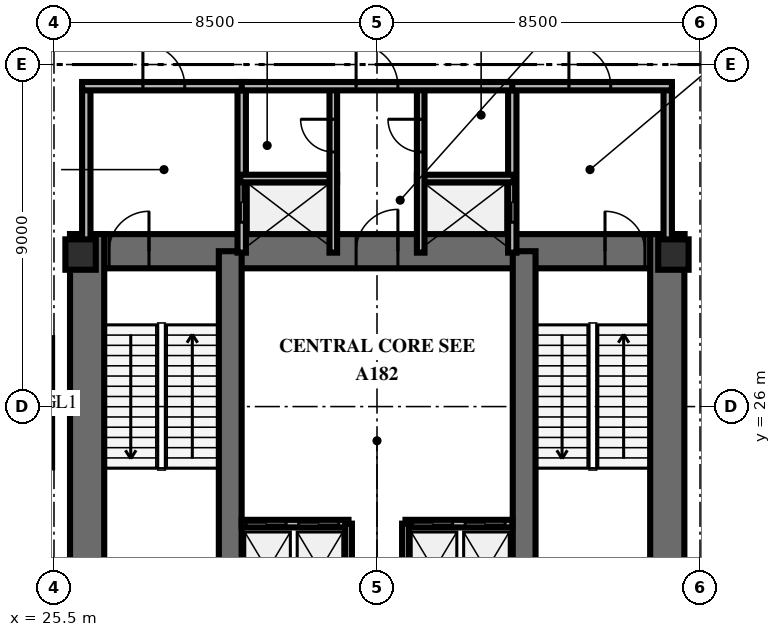
"""IFC4 building model, lengths in metres.
Left out: names, types, materials, properties, quantities, classifications, styles, units other than length and angle.
Written with IfcOpenShell. Run it as: python <this file> out.ifc"""

import sys

from ifc_helpers import new_model, si_unit, direction, frame, frame_2d, origin, origin_2d, place, context, subcontext, project, spatial, rectangle, extrude, element, fill, save


model = new_model("IFC4")
c1 = context("Model", 3, precision=1e-05, world=origin(), true_north=direction((0.0, 1.0)))
c2 = subcontext(c1, "Body", "Model", "MODEL_VIEW")
j1 = project(units=[si_unit("LENGTHUNIT", "METRE"), si_unit("PLANEANGLEUNIT", "RADIAN")], contexts=[c1])
p1 = place(None, origin())
s1 = spatial("IfcSite", under=j1, at=p1, CompositionType="ELEMENT")
p2 = place(p1, origin())
s2 = spatial("IfcBuilding", under=s1, at=p2, CompositionType="ELEMENT")
p3 = place(p2, frame((0.0, 0.0, -9.6)))
s3 = spatial("IfcBuildingStorey", under=s2, at=p3, CompositionType="ELEMENT", Elevation=-9.6)
p4 = place(p3, frame((25.922, 30.088, 0.0), z_axis=(0.0, 0.0, 1.0), x_axis=(1.0, 0.0, 0.0)))
e1 = element("IfcWall", 1, at=p4, inside=s3, PredefinedType="SHEAR", context=c2, shape_type="SweptSolid", body=[
    extrude(rectangle(XDim=16.166, YDim=0.9, at=frame_2d((8.083, 0.0))), origin(), (0.0, 0.0, 1.0), 4.8),
])
p5 = place(p4, frame((1.028, 0.0, 0.0)))
e2 = element("IfcOpeningElement", 2, at=p5, cuts=e1, PredefinedType="OPENING", context=c2, shape_type="SweptSolid", body=[
    extrude(rectangle(XDim=1.05, YDim=2.15, at=frame_2d((0.525, 1.075))), frame((0.0, 0.46, 0.0), z_axis=(0.0, -1.0, 0.0), x_axis=(1.0, 0.0, 0.0)), (0.0, 0.0, 1.0), 0.92),
])
p6 = place(p4, frame((14.078, 0.0, 0.0)))
e3 = element("IfcOpeningElement", 3, at=p6, cuts=e1, PredefinedType="OPENING", context=c2, shape_type="SweptSolid", body=[
    extrude(rectangle(XDim=1.05, YDim=2.15, at=frame_2d((0.525, 1.075))), frame((0.0, 0.46, 0.0), z_axis=(0.0, -1.0, 0.0), x_axis=(1.0, 0.0, 0.0)), (0.0, 0.0, 1.0), 0.92),
])
p7 = place(p4, frame((7.528, 0.0, 0.0)))
e4 = element("IfcOpeningElement", 4, at=p7, cuts=e1, PredefinedType="OPENING", context=c2, shape_type="SweptSolid", body=[
    extrude(rectangle(XDim=1.1, YDim=2.15, at=frame_2d((0.55, 1.075))), frame((0.0, 0.46, 0.0), z_axis=(0.0, -1.0, 0.0), x_axis=(1.0, 0.0, 0.0)), (0.0, 0.0, 1.0), 0.92),
])
for number, where, z_axis, x_axis in (
    (5, (26.372, 19.662, 0.0), (0.0, 0.0, 1.0), (0.0, 1.0, 0.0)),
    (6, (41.638, 19.662, 0.0), (0.0, 0.0, 1.0), (0.0, 1.0, 0.0)),
):
    element("IfcWall", number, at=place(p3, frame(where, z_axis=z_axis, x_axis=x_axis)), inside=s3, PredefinedType="SHEAR", context=c2, shape_type="SweptSolid", body=[
        extrude(rectangle(XDim=10.876, YDim=0.9, at=frame_2d((5.438, 0.0))), origin(), (0.0, 0.0, 1.0), 4.8),
    ])
for number, where, z_axis, x_axis in (
    (7, (30.138, 20.112, 0.0), (0.0, 0.0, 1.0), (0.0, 1.0, 0.0)),
    (8, (37.872, 20.112, 0.0), (0.0, 0.0, 1.0), (0.0, 1.0, 0.0)),
):
    element("IfcWall", number, at=place(p3, frame(where, z_axis=z_axis, x_axis=x_axis)), inside=s3, PredefinedType="SHEAR", context=c2, shape_type="SweptSolid", body=[
        extrude(rectangle(XDim=9.976, YDim=0.6, at=frame_2d((4.988, 0.0))), origin(), (0.0, 0.0, 1.0), 4.8),
    ])
for number, where, z_axis, x_axis in (
    (9, (26.2, 30.0, 0.0), (0.0, 0.0, 1.0), (1.0, 0.0, 0.0)),
    (10, (41.8, 30.0, 0.0), (0.0, 0.0, 1.0), (1.0, 0.0, 0.0)),
):
    element("IfcColumn", number, at=place(p3, frame(where, z_axis=z_axis, x_axis=x_axis)), inside=s3, PredefinedType="PILASTER", context=c2, shape_type="SweptSolid", body=[
        extrude(rectangle(XDim=0.8, YDim=0.8, at=origin_2d()), origin(), (0.0, 0.0, 1.0), 4.8),
    ])
p8 = place(p3, frame((26.35, 30.05, 0.0), z_axis=(0.0, 0.0, 1.0), x_axis=(0.0, 1.0, 0.0)))
e11 = element("IfcWall", 11, at=p8, inside=s3, PredefinedType="SOLIDWALL", context=c2, shape_type="SweptSolid", body=[
    extrude(rectangle(XDim=4.38, YDim=0.22, at=frame_2d((2.19, 0.0))), origin(), (0.0, 0.0, 1.0), 3.56),
])
p9 = place(p3, frame((30.44, 30.05, 0.0), z_axis=(0.0, 0.0, 1.0), x_axis=(0.0, 1.0, 0.0)))
e12 = element("IfcWall", 12, at=p9, inside=s3, PredefinedType="SOLIDWALL", context=c2, shape_type="SweptSolid", body=[
    extrude(rectangle(XDim=4.38, YDim=0.22, at=frame_2d((2.19, 0.0))), origin(), (0.0, 0.0, 1.0), 3.56),
])
p10 = place(p9, frame((0.8, 0.0, 0.0)))
e13 = element("IfcOpeningElement", 13, at=p10, cuts=e12, PredefinedType="OPENING", context=c2, shape_type="SweptSolid", body=[
    extrude(rectangle(XDim=1.05, YDim=2.1, at=frame_2d((0.525, 1.05))), frame((0.0, 0.12, 0.0), z_axis=(0.0, -1.0, 0.0), x_axis=(1.0, 0.0, 0.0)), (0.0, 0.0, 1.0), 0.24),
])
p11 = place(p3, frame((26.24, 34.43, 0.0), z_axis=(0.0, 0.0, 1.0), x_axis=(1.0, 0.0, 0.0)))
e14 = element("IfcWall", 14, at=p11, inside=s3, PredefinedType="SOLIDWALL", context=c2, shape_type="SweptSolid", body=[
    extrude(rectangle(XDim=4.31, YDim=0.22, at=frame_2d((2.155, 0.0))), origin(), (0.0, 0.0, 1.0), 3.56),
])
p12 = place(p11, frame((1.6, 0.0, 0.0)))
e15 = element("IfcOpeningElement", 15, at=p12, cuts=e14, PredefinedType="OPENING", context=c2, shape_type="SweptSolid", body=[
    extrude(rectangle(XDim=1.1, YDim=2.15, at=frame_2d((0.55, 1.075))), frame((0.0, 0.12, 0.0), z_axis=(0.0, -1.0, 0.0), x_axis=(1.0, 0.0, 0.0)), (0.0, 0.0, 1.0), 0.24),
])
p13 = place(p3, frame((30.4, 32.0, 0.0), z_axis=(0.0, 0.0, 1.0), x_axis=(1.0, 0.0, 0.0)))
e16 = element("IfcWall", 16, at=p13, inside=s3, PredefinedType="SOLIDWALL", context=c2, shape_type="SweptSolid", body=[
    extrude(rectangle(XDim=2.55, YDim=0.2, at=frame_2d((1.275, 0.0))), origin(), (0.0, 0.0, 1.0), 3.56),
])
p14 = place(p3, frame((32.85, 30.05, 0.0), z_axis=(0.0, 0.0, 1.0), x_axis=(0.0, 1.0, 0.0)))
e17 = element("IfcWall", 17, at=p14, inside=s3, PredefinedType="SOLIDWALL", context=c2, shape_type="SweptSolid", body=[
    extrude(rectangle(XDim=4.38, YDim=0.2, at=frame_2d((2.19, 0.0))), origin(), (0.0, 0.0, 1.0), 3.56),
])
p15 = place(p14, frame((2.65, 0.0, 0.0)))
e18 = element("IfcOpeningElement", 18, at=p15, cuts=e17, PredefinedType="OPENING", context=c2, shape_type="SweptSolid", body=[
    extrude(rectangle(XDim=0.86, YDim=2.05, at=frame_2d((0.43, 1.025))), frame((0.0, 0.11, 0.0), z_axis=(0.0, -1.0, 0.0), x_axis=(1.0, 0.0, 0.0)), (0.0, 0.0, 1.0), 0.22),
])
p16 = place(p3, frame((37.56, 30.05, 0.0), z_axis=(0.0, 0.0, 1.0), x_axis=(0.0, 1.0, 0.0)))
e19 = element("IfcWall", 19, at=p16, inside=s3, PredefinedType="SOLIDWALL", context=c2, shape_type="SweptSolid", body=[
    extrude(rectangle(XDim=4.38, YDim=0.22, at=frame_2d((2.19, 0.0))), origin(), (0.0, 0.0, 1.0), 3.56),
])
p17 = place(p16, frame((0.8, 0.0, 0.0)))
e20 = element("IfcOpeningElement", 20, at=p17, cuts=e19, PredefinedType="OPENING", context=c2, shape_type="SweptSolid", body=[
    extrude(rectangle(XDim=1.05, YDim=2.1, at=frame_2d((0.525, 1.05))), frame((0.0, 0.12, 0.0), z_axis=(0.0, -1.0, 0.0), x_axis=(1.0, 0.0, 0.0)), (0.0, 0.0, 1.0), 0.24),
])
p18 = place(p3, frame((41.65, 30.05, 0.0), z_axis=(0.0, 0.0, 1.0), x_axis=(0.0, 1.0, 0.0)))
e21 = element("IfcWall", 21, at=p18, inside=s3, PredefinedType="SOLIDWALL", context=c2, shape_type="SweptSolid", body=[
    extrude(rectangle(XDim=4.38, YDim=0.22, at=frame_2d((2.19, 0.0))), origin(), (0.0, 0.0, 1.0), 3.56),
])
p19 = place(p3, frame((37.45, 34.43, 0.0), z_axis=(0.0, 0.0, 1.0), x_axis=(1.0, 0.0, 0.0)))
e22 = element("IfcWall", 22, at=p19, inside=s3, PredefinedType="SOLIDWALL", context=c2, shape_type="SweptSolid", body=[
    extrude(rectangle(XDim=4.31, YDim=0.22, at=frame_2d((2.155, 0.0))), origin(), (0.0, 0.0, 1.0), 3.56),
])
p20 = place(p19, frame((1.6, 0.0, 0.0)))
e23 = element("IfcOpeningElement", 23, at=p20, cuts=e22, PredefinedType="OPENING", context=c2, shape_type="SweptSolid", body=[
    extrude(rectangle(XDim=1.1, YDim=2.15, at=frame_2d((0.55, 1.075))), frame((0.0, 0.12, 0.0), z_axis=(0.0, -1.0, 0.0), x_axis=(1.0, 0.0, 0.0)), (0.0, 0.0, 1.0), 0.24),
])
p21 = place(p3, frame((35.05, 32.0, 0.0), z_axis=(0.0, 0.0, 1.0), x_axis=(1.0, 0.0, 0.0)))
e24 = element("IfcWall", 24, at=p21, inside=s3, PredefinedType="SOLIDWALL", context=c2, shape_type="SweptSolid", body=[
    extrude(rectangle(XDim=2.55, YDim=0.2, at=frame_2d((1.275, 0.0))), origin(), (0.0, 0.0, 1.0), 3.56),
])
p22 = place(p3, frame((35.15, 30.05, 0.0), z_axis=(0.0, 0.0, 1.0), x_axis=(0.0, 1.0, 0.0)))
e25 = element("IfcWall", 25, at=p22, inside=s3, PredefinedType="SOLIDWALL", context=c2, shape_type="SweptSolid", body=[
    extrude(rectangle(XDim=4.38, YDim=0.2, at=frame_2d((2.19, 0.0))), origin(), (0.0, 0.0, 1.0), 3.56),
])
p23 = place(p22, frame((2.65, 0.0, 0.0)))
e26 = element("IfcOpeningElement", 26, at=p23, cuts=e25, PredefinedType="OPENING", context=c2, shape_type="SweptSolid", body=[
    extrude(rectangle(XDim=0.86, YDim=2.05, at=frame_2d((0.43, 1.025))), frame((0.0, 0.11, 0.0), z_axis=(0.0, -1.0, 0.0), x_axis=(1.0, 0.0, 0.0)), (0.0, 0.0, 1.0), 0.22),
])
p24 = place(p3, frame((30.44, 34.43, 0.0), z_axis=(0.0, 0.0, 1.0), x_axis=(1.0, 0.0, 0.0)))
e27 = element("IfcWall", 27, at=p24, inside=s3, PredefinedType="SOLIDWALL", context=c2, shape_type="SweptSolid", body=[
    extrude(rectangle(XDim=7.12, YDim=0.22, at=frame_2d((3.56, 0.0))), origin(), (0.0, 0.0, 1.0), 3.56),
])
p25 = place(p24, frame((3.01, 0.0, 0.0)))
e28 = element("IfcOpeningElement", 28, at=p25, cuts=e27, PredefinedType="OPENING", context=c2, shape_type="SweptSolid", body=[
    extrude(rectangle(XDim=1.1, YDim=2.15, at=frame_2d((0.55, 1.075))), frame((0.0, 0.12, 0.0), z_axis=(0.0, -1.0, 0.0), x_axis=(1.0, 0.0, 0.0)), (0.0, 0.0, 1.0), 0.24),
])
p26 = place(p3, frame((30.44, 22.92, 0.0), z_axis=(0.0, 0.0, 1.0), x_axis=(1.0, 0.0, 0.0)))
e29 = element("IfcWall", 29, at=p26, inside=s3, PredefinedType="SOLIDWALL", context=c2, shape_type="SweptSolid", body=[
    extrude(rectangle(XDim=2.81, YDim=0.2, at=frame_2d((1.405, 0.0))), origin(), (0.0, 0.0, 1.0), 3.56),
])
p27 = place(p26, frame((0.12, 0.0, 0.0)))
e30 = element("IfcOpeningElement", 30, at=p27, cuts=e29, PredefinedType="OPENING", context=c2, shape_type="SweptSolid", body=[
    extrude(rectangle(XDim=1.05, YDim=2.1, at=frame_2d((0.525, 1.05))), frame((0.0, 0.11, 0.0), z_axis=(0.0, -1.0, 0.0), x_axis=(1.0, 0.0, 0.0)), (0.0, 0.0, 1.0), 0.22),
])
p28 = place(p26, frame((1.5, 0.0, 0.0)))
e31 = element("IfcOpeningElement", 31, at=p28, cuts=e29, PredefinedType="OPENING", context=c2, shape_type="SweptSolid", body=[
    extrude(rectangle(XDim=1.05, YDim=2.1, at=frame_2d((0.525, 1.05))), frame((0.0, 0.11, 0.0), z_axis=(0.0, -1.0, 0.0), x_axis=(1.0, 0.0, 0.0)), (0.0, 0.0, 1.0), 0.22),
])
p29 = place(p3, frame((33.25, 20.5, 0.0), z_axis=(0.0, 0.0, 1.0), x_axis=(0.0, 1.0, 0.0)))
e32 = element("IfcWall", 32, at=p29, inside=s3, PredefinedType="SOLIDWALL", context=c2, shape_type="SweptSolid", body=[
    extrude(rectangle(XDim=2.42, YDim=0.18, at=frame_2d((1.21, 0.0))), origin(), (0.0, 0.0, 1.0), 3.56),
])
p30 = place(p3, frame((34.75, 22.92, 0.0), z_axis=(0.0, 0.0, 1.0), x_axis=(1.0, 0.0, 0.0)))
e33 = element("IfcWall", 33, at=p30, inside=s3, PredefinedType="SOLIDWALL", context=c2, shape_type="SweptSolid", body=[
    extrude(rectangle(XDim=2.81, YDim=0.2, at=frame_2d((1.405, 0.0))), origin(), (0.0, 0.0, 1.0), 3.56),
])
p31 = place(p30, frame((0.19, 0.0, 0.0)))
e34 = element("IfcOpeningElement", 34, at=p31, cuts=e33, PredefinedType="OPENING", context=c2, shape_type="SweptSolid", body=[
    extrude(rectangle(XDim=1.05, YDim=2.1, at=frame_2d((0.525, 1.05))), frame((0.0, 0.11, 0.0), z_axis=(0.0, -1.0, 0.0), x_axis=(1.0, 0.0, 0.0)), (0.0, 0.0, 1.0), 0.22),
])
p32 = place(p30, frame((1.57, 0.0, 0.0)))
e35 = element("IfcOpeningElement", 35, at=p32, cuts=e33, PredefinedType="OPENING", context=c2, shape_type="SweptSolid", body=[
    extrude(rectangle(XDim=1.05, YDim=2.1, at=frame_2d((0.525, 1.05))), frame((0.0, 0.11, 0.0), z_axis=(0.0, -1.0, 0.0), x_axis=(1.0, 0.0, 0.0)), (0.0, 0.0, 1.0), 0.22),
])
p33 = place(p3, frame((34.75, 20.5, 0.0), z_axis=(0.0, 0.0, 1.0), x_axis=(0.0, 1.0, 0.0)))
e36 = element("IfcWall", 36, at=p33, inside=s3, PredefinedType="SOLIDWALL", context=c2, shape_type="SweptSolid", body=[
    extrude(rectangle(XDim=2.42, YDim=0.18, at=frame_2d((1.21, 0.0))), origin(), (0.0, 0.0, 1.0), 3.56),
])
p34 = place(p5, origin())
e37 = element("IfcDoor", 37, at=p34, inside=s3, OperationType="SINGLE_SWING_RIGHT", PredefinedType="DOOR", context=c2, shape_type="SweptSolid", body=[
    extrude(rectangle(XDim=1.05, YDim=2.15, at=frame_2d((0.525, 1.075))), frame((0.0, 0.025, 0.0), z_axis=(0.0, -1.0, 0.0), x_axis=(1.0, 0.0, 0.0)), (0.0, 0.0, 1.0), 0.05),
])
fill(e2, e37)
p35 = place(p6, origin())
e38 = element("IfcDoor", 38, at=p35, inside=s3, OperationType="SINGLE_SWING_LEFT", PredefinedType="DOOR", context=c2, shape_type="SweptSolid", body=[
    extrude(rectangle(XDim=1.05, YDim=2.15, at=frame_2d((0.525, 1.075))), frame((0.0, 0.025, 0.0), z_axis=(0.0, -1.0, 0.0), x_axis=(1.0, 0.0, 0.0)), (0.0, 0.0, 1.0), 0.05),
])
fill(e3, e38)
p36 = place(p7, origin())
e39 = element("IfcDoor", 39, at=p36, inside=s3, OperationType="SINGLE_SWING_RIGHT", PredefinedType="DOOR", context=c2, shape_type="SweptSolid", body=[
    extrude(rectangle(XDim=1.1, YDim=2.15, at=frame_2d((0.55, 1.075))), frame((0.0, 0.025, 0.0), z_axis=(0.0, -1.0, 0.0), x_axis=(1.0, 0.0, 0.0)), (0.0, 0.0, 1.0), 0.05),
])
fill(e4, e39)
p37 = place(p12, origin())
e40 = element("IfcDoor", 40, at=p37, inside=s3, OperationType="SINGLE_SWING_LEFT", PredefinedType="DOOR", context=c2, shape_type="SweptSolid", body=[
    extrude(rectangle(XDim=1.1, YDim=2.15, at=frame_2d((0.55, 1.075))), frame((0.0, 0.025, 0.0), z_axis=(0.0, -1.0, 0.0), x_axis=(1.0, 0.0, 0.0)), (0.0, 0.0, 1.0), 0.05),
])
fill(e15, e40)
p38 = place(p10, origin())
e41 = element("IfcDoor", 41, at=p38, inside=s3, OperationType="DOUBLE_DOOR_SLIDING", PredefinedType="USERDEFINED", context=c2, shape_type="SweptSolid", body=[
    extrude(rectangle(XDim=1.05, YDim=2.1, at=frame_2d((0.525, 1.05))), frame((0.0, 0.025, 0.0), z_axis=(0.0, -1.0, 0.0), x_axis=(1.0, 0.0, 0.0)), (0.0, 0.0, 1.0), 0.05),
])
fill(e13, e41)
p39 = place(p15, origin())
e42 = element("IfcDoor", 42, at=p39, inside=s3, OperationType="SINGLE_SWING_RIGHT", PredefinedType="TRAPDOOR", context=c2, shape_type="SweptSolid", body=[
    extrude(rectangle(XDim=0.86, YDim=2.05, at=frame_2d((0.43, 1.025))), frame((0.0, 0.025, 0.0), z_axis=(0.0, -1.0, 0.0), x_axis=(1.0, 0.0, 0.0)), (0.0, 0.0, 1.0), 0.05),
])
fill(e18, e42)
p40 = place(p20, origin())
e43 = element("IfcDoor", 43, at=p40, inside=s3, OperationType="SINGLE_SWING_LEFT", PredefinedType="DOOR", context=c2, shape_type="SweptSolid", body=[
    extrude(rectangle(XDim=1.1, YDim=2.15, at=frame_2d((0.55, 1.075))), frame((0.0, 0.025, 0.0), z_axis=(0.0, -1.0, 0.0), x_axis=(1.0, 0.0, 0.0)), (0.0, 0.0, 1.0), 0.05),
])
fill(e23, e43)
p41 = place(p17, origin())
e44 = element("IfcDoor", 44, at=p41, inside=s3, OperationType="DOUBLE_DOOR_SLIDING", PredefinedType="USERDEFINED", context=c2, shape_type="SweptSolid", body=[
    extrude(rectangle(XDim=1.05, YDim=2.1, at=frame_2d((0.525, 1.05))), frame((0.0, 0.025, 0.0), z_axis=(0.0, -1.0, 0.0), x_axis=(1.0, 0.0, 0.0)), (0.0, 0.0, 1.0), 0.05),
])
fill(e20, e44)
p42 = place(p23, origin())
e45 = element("IfcDoor", 45, at=p42, inside=s3, OperationType="SINGLE_SWING_RIGHT", PredefinedType="TRAPDOOR", context=c2, shape_type="SweptSolid", body=[
    extrude(rectangle(XDim=0.86, YDim=2.05, at=frame_2d((0.43, 1.025))), frame((0.0, 0.025, 0.0), z_axis=(0.0, -1.0, 0.0), x_axis=(1.0, 0.0, 0.0)), (0.0, 0.0, 1.0), 0.05),
])
fill(e26, e45)
p43 = place(p25, origin())
e46 = element("IfcDoor", 46, at=p43, inside=s3, OperationType="SINGLE_SWING_LEFT", PredefinedType="DOOR", context=c2, shape_type="SweptSolid", body=[
    extrude(rectangle(XDim=1.1, YDim=2.15, at=frame_2d((0.55, 1.075))), frame((0.0, 0.025, 0.0), z_axis=(0.0, -1.0, 0.0), x_axis=(1.0, 0.0, 0.0)), (0.0, 0.0, 1.0), 0.05),
])
fill(e28, e46)
p44 = place(p27, origin())
e47 = element("IfcDoor", 47, at=p44, inside=s3, OperationType="DOUBLE_DOOR_SLIDING", PredefinedType="USERDEFINED", context=c2, shape_type="SweptSolid", body=[
    extrude(rectangle(XDim=1.05, YDim=2.1, at=frame_2d((0.525, 1.05))), frame((0.0, 0.025, 0.0), z_axis=(0.0, -1.0, 0.0), x_axis=(1.0, 0.0, 0.0)), (0.0, 0.0, 1.0), 0.05),
])
fill(e30, e47)
p45 = place(p28, origin())
e48 = element("IfcDoor", 48, at=p45, inside=s3, OperationType="DOUBLE_DOOR_SLIDING", PredefinedType="USERDEFINED", context=c2, shape_type="SweptSolid", body=[
    extrude(rectangle(XDim=1.05, YDim=2.1, at=frame_2d((0.525, 1.05))), frame((0.0, 0.025, 0.0), z_axis=(0.0, -1.0, 0.0), x_axis=(1.0, 0.0, 0.0)), (0.0, 0.0, 1.0), 0.05),
])
fill(e31, e48)
p46 = place(p31, origin())
e49 = element("IfcDoor", 49, at=p46, inside=s3, OperationType="DOUBLE_DOOR_SLIDING", PredefinedType="USERDEFINED", context=c2, shape_type="SweptSolid", body=[
    extrude(rectangle(XDim=1.05, YDim=2.1, at=frame_2d((0.525, 1.05))), frame((0.0, 0.025, 0.0), z_axis=(0.0, -1.0, 0.0), x_axis=(1.0, 0.0, 0.0)), (0.0, 0.0, 1.0), 0.05),
])
fill(e34, e49)
p47 = place(p32, origin())
e50 = element("IfcDoor", 50, at=p47, inside=s3, OperationType="DOUBLE_DOOR_SLIDING", PredefinedType="USERDEFINED", context=c2, shape_type="SweptSolid", body=[
    extrude(rectangle(XDim=1.05, YDim=2.1, at=frame_2d((0.525, 1.05))), frame((0.0, 0.025, 0.0), z_axis=(0.0, -1.0, 0.0), x_axis=(1.0, 0.0, 0.0)), (0.0, 0.0, 1.0), 0.05),
])
fill(e35, e50)
save(model, sys.argv[1])
